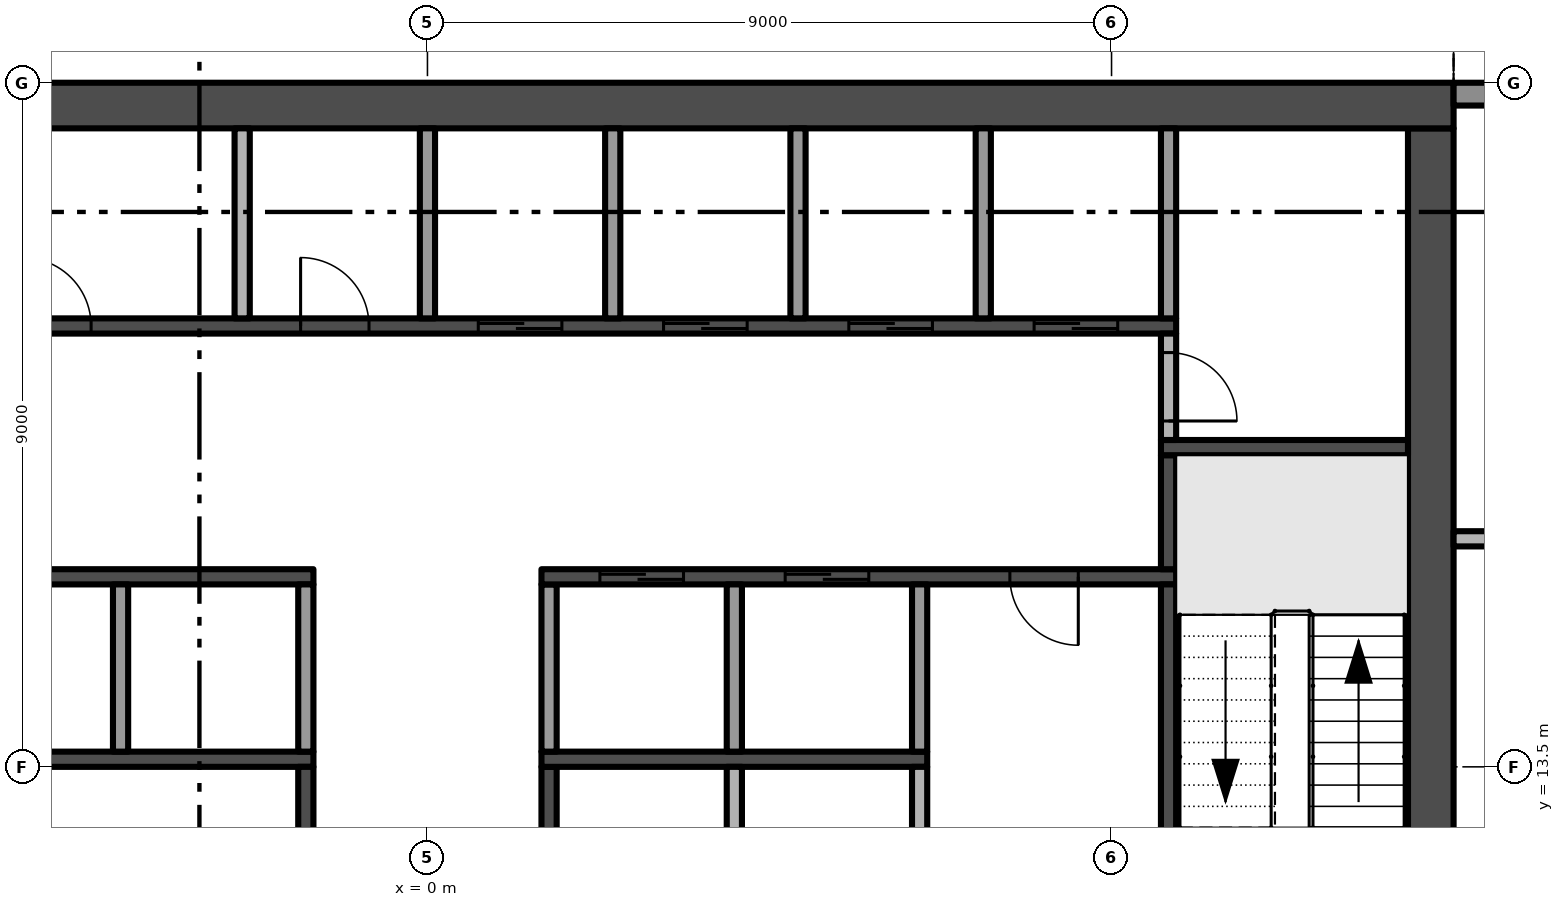
"""IFC4 building model, lengths in metres.
Left out: names, types, materials, properties, quantities, classifications, styles, units other than length and angle.
Written with IfcOpenShell. Run it as: python <this file> out.ifc"""

import sys

from ifc_helpers import new_model, si_unit, direction, frame, frame_2d, origin, place, context, subcontext, project, spatial, polyline, rectangle, outline, extrude, element, fill, save


model = new_model("IFC4")
c1 = context("Model", 3, precision=1e-05, world=origin(), true_north=direction((0.0, 1.0)))
c2 = subcontext(c1, "Body", "Model", "MODEL_VIEW")
j1 = project(units=[si_unit("LENGTHUNIT", "METRE"), si_unit("PLANEANGLEUNIT", "RADIAN")], contexts=[c1])
p1 = place(None, origin())
s1 = spatial("IfcSite", under=j1, at=p1, CompositionType="ELEMENT")
p2 = place(p1, origin())
s2 = spatial("IfcBuilding", under=s1, at=p2, CompositionType="ELEMENT")
p3 = place(p2, frame((0.0, 0.0, 246.4)))
s3 = spatial("IfcBuildingStorey", under=s2, at=p3, CompositionType="ELEMENT", Elevation=246.4)
p4 = place(p3, frame((13.2, 5.1, -0.3), z_axis=(0.0, 0.0, 1.0), x_axis=(0.0, 1.0, 0.0)))
e1 = element("IfcWall", 1, at=p4, inside=s3, PredefinedType="SHEAR", context=c2, shape_type="SweptSolid", body=[
    extrude(rectangle(XDim=16.8, YDim=0.6, at=frame_2d((8.4, 0.0))), origin(), (0.0, 0.0, 1.0), 3.8),
])
p5 = place(p4, frame((6.3, 0.0, 0.3)))
e2 = element("IfcOpeningElement", 2, at=p5, cuts=e1, PredefinedType="OPENING", context=c2, shape_type="SweptSolid", body=[
    extrude(rectangle(XDim=1.2, YDim=2.2, at=frame_2d((0.6, 1.1))), frame((0.0, 0.31, 0.0), z_axis=(0.0, -1.0, 0.0), x_axis=(1.0, 0.0, 0.0)), (0.0, 0.0, 1.0), 0.62),
])
p6 = place(p3, frame((13.5, 22.2, -0.3), z_axis=(0.0, 0.0, 1.0), x_axis=(-1.0, 0.0, 0.0)))
e3 = element("IfcWall", 3, at=p6, inside=s3, PredefinedType="SHEAR", context=c2, shape_type="SweptSolid", body=[
    extrude(rectangle(XDim=27.0, YDim=0.6, at=frame_2d((13.5, 0.0))), origin(), (0.0, 0.0, 1.0), 3.8),
])
p7 = place(p3, frame((13.5, 22.35, 0.0), z_axis=(0.0, 0.0, 1.0), x_axis=(1.0, 0.0, 0.0)))
e4 = element("IfcWall", 4, at=p7, inside=s3, PredefinedType="SOLIDWALL", context=c2, shape_type="SweptSolid", body=[
    extrude(rectangle(XDim=4.05, YDim=0.3, at=frame_2d((2.025, 0.0))), origin(), (0.0, 0.0, 1.0), 3.5),
])
p8 = place(p7, frame((0.55, 0.0, 0.45)))
e5 = element("IfcOpeningElement", 5, at=p8, cuts=e4, PredefinedType="OPENING", context=c2, shape_type="SweptSolid", body=[
    extrude(rectangle(XDim=3.2, YDim=2.65, at=frame_2d((1.6, 1.325))), frame((0.0, 0.16, 0.0), z_axis=(0.0, -1.0, 0.0), x_axis=(1.0, 0.0, 0.0)), (0.0, 0.0, 1.0), 0.32),
])
p9 = place(p3, origin())
e6 = element("IfcWall", 6, at=p9, inside=s3, PredefinedType="USERDEFINED", context=c2, shape_type="SweptSolid", body=[
    extrude(outline(polyline([(22.5, 25.149), (21.0, 25.485), (20.625, 25.5), (19.5, 25.369), (18.0, 24.845), (16.5, 24.112), (15.0, 23.451), (13.5, 23.115), (13.555, 22.871), (15.079, 23.213), (16.605, 23.885), (18.096, 24.614), (19.556, 25.124), (20.635, 25.249), (20.967, 25.236), (22.445, 24.905), (22.5, 25.149)])), origin(), (0.0, 0.0, 1.0), 0.9),
])
p10 = place(p3, frame((-1.5, 16.0, 0.0), z_axis=(0.0, 0.0, 1.0), x_axis=(-1.0, 0.0, 0.0)))
e7 = element("IfcWall", 7, at=p10, inside=s3, PredefinedType="SHEAR", context=c2, shape_type="SweptSolid", body=[
    extrude(rectangle(XDim=8.35, YDim=0.2, at=frame_2d((4.175, 0.0))), origin(), (0.0, 0.0, 1.0), 3.5),
])
p11 = place(p10, frame((6.162, 0.0, 0.0)))
e8 = element("IfcOpeningElement", 8, at=p11, cuts=e7, PredefinedType="OPENING", context=c2, shape_type="SweptSolid", body=[
    extrude(rectangle(XDim=0.9, YDim=2.1, at=frame_2d((0.45, 1.05))), frame((0.0, 0.11, 0.0), z_axis=(0.0, -1.0, 0.0), x_axis=(1.0, 0.0, 0.0)), (0.0, 0.0, 1.0), 0.22),
])
p12 = place(p3, frame((-9.85, 19.3, 0.0), z_axis=(0.0, 0.0, 1.0), x_axis=(1.0, 0.0, 0.0)))
e9 = element("IfcWall", 9, at=p12, inside=s3, PredefinedType="SHEAR", context=c2, shape_type="SweptSolid", body=[
    extrude(rectangle(XDim=19.7, YDim=0.2, at=frame_2d((9.85, 0.0))), origin(), (0.0, 0.0, 1.0), 3.5),
])
p13 = place(p12, frame((10.519, 0.0, 0.0)))
e10 = element("IfcOpeningElement", 10, at=p13, cuts=e9, PredefinedType="OPENING", context=c2, shape_type="SweptSolid", body=[
    extrude(rectangle(XDim=1.1, YDim=2.1, at=frame_2d((0.55, 1.05))), frame((0.0, 0.11, 0.0), z_axis=(0.0, -1.0, 0.0), x_axis=(1.0, 0.0, 0.0)), (0.0, 0.0, 1.0), 0.22),
])
p14 = place(p12, frame((12.956, 0.0, 0.0)))
e11 = element("IfcOpeningElement", 11, at=p14, cuts=e9, PredefinedType="OPENING", context=c2, shape_type="SweptSolid", body=[
    extrude(rectangle(XDim=1.1, YDim=2.1, at=frame_2d((0.55, 1.05))), frame((0.0, 0.11, 0.0), z_axis=(0.0, -1.0, 0.0), x_axis=(1.0, 0.0, 0.0)), (0.0, 0.0, 1.0), 0.22),
])
p15 = place(p12, frame((15.394, 0.0, 0.0)))
e12 = element("IfcOpeningElement", 12, at=p15, cuts=e9, PredefinedType="OPENING", context=c2, shape_type="SweptSolid", body=[
    extrude(rectangle(XDim=1.1, YDim=2.1, at=frame_2d((0.55, 1.05))), frame((0.0, 0.11, 0.0), z_axis=(0.0, -1.0, 0.0), x_axis=(1.0, 0.0, 0.0)), (0.0, 0.0, 1.0), 0.22),
])
p16 = place(p12, frame((17.831, 0.0, 0.0)))
e13 = element("IfcOpeningElement", 13, at=p16, cuts=e9, PredefinedType="OPENING", context=c2, shape_type="SweptSolid", body=[
    extrude(rectangle(XDim=1.1, YDim=2.1, at=frame_2d((0.55, 1.05))), frame((0.0, 0.11, 0.0), z_axis=(0.0, -1.0, 0.0), x_axis=(1.0, 0.0, 0.0)), (0.0, 0.0, 1.0), 0.22),
])
p17 = place(p12, frame((0.869, 0.0, 0.0)))
e14 = element("IfcOpeningElement", 14, at=p17, cuts=e9, PredefinedType="OPENING", context=c2, shape_type="SweptSolid", body=[
    extrude(rectangle(XDim=0.9, YDim=2.1, at=frame_2d((0.45, 1.05))), frame((0.0, 0.11, 0.0), z_axis=(0.0, -1.0, 0.0), x_axis=(1.0, 0.0, 0.0)), (0.0, 0.0, 1.0), 0.22),
])
p18 = place(p12, frame((4.525, 0.0, 0.0)))
e15 = element("IfcOpeningElement", 15, at=p18, cuts=e9, PredefinedType="OPENING", context=c2, shape_type="SweptSolid", body=[
    extrude(rectangle(XDim=0.9, YDim=2.1, at=frame_2d((0.45, 1.05))), frame((0.0, 0.11, 0.0), z_axis=(0.0, -1.0, 0.0), x_axis=(1.0, 0.0, 0.0)), (0.0, 0.0, 1.0), 0.22),
])
p19 = place(p12, frame((8.181, 0.0, 0.0)))
e16 = element("IfcOpeningElement", 16, at=p19, cuts=e9, PredefinedType="OPENING", context=c2, shape_type="SweptSolid", body=[
    extrude(rectangle(XDim=0.9, YDim=2.1, at=frame_2d((0.45, 1.05))), frame((0.0, 0.11, 0.0), z_axis=(0.0, -1.0, 0.0), x_axis=(1.0, 0.0, 0.0)), (0.0, 0.0, 1.0), 0.22),
])
p20 = place(p3, frame((-6.575, 13.6, 0.0), z_axis=(0.0, 0.0, 1.0), x_axis=(1.0, 0.0, 0.0)))
e17 = element("IfcWall", 17, at=p20, inside=s3, PredefinedType="SHEAR", context=c2, shape_type="SweptSolid", body=[
    extrude(rectangle(XDim=5.075, YDim=0.2, at=frame_2d((2.538, 0.0))), origin(), (0.0, 0.0, 1.0), 3.5),
])
p21 = place(p3, frame((-4.037, 13.7, 0.0), z_axis=(0.0, 0.0, 1.0), x_axis=(0.0, 1.0, 0.0)))
e18 = element("IfcWall", 18, at=p21, inside=s3, PredefinedType="PARTITIONING", context=c2, shape_type="SweptSolid", body=[
    extrude(rectangle(XDim=2.2, YDim=0.2, at=frame_2d((1.1, 0.0))), origin(), (0.0, 0.0, 1.0), 3.5),
])
p22 = place(p3, frame((-2.438, 19.4, 0.0), z_axis=(0.0, 0.0, 1.0), x_axis=(0.0, 1.0, 0.0)))
e19 = element("IfcWall", 19, at=p22, inside=s3, PredefinedType="PARTITIONING", context=c2, shape_type="SweptSolid", body=[
    extrude(rectangle(XDim=2.5, YDim=0.2, at=frame_2d((1.25, 0.0))), origin(), (0.0, 0.0, 1.0), 3.5),
])
p23 = place(p3, frame((-1.6, 8.15, 0.0), z_axis=(0.0, 0.0, 1.0), x_axis=(0.0, 1.0, 0.0)))
e20 = element("IfcWall", 20, at=p23, inside=s3, PredefinedType="SHEAR", context=c2, shape_type="SweptSolid", body=[
    extrude(rectangle(XDim=5.35, YDim=0.2, at=frame_2d((2.675, 0.0))), origin(), (0.0, 0.0, 1.0), 3.5),
])
p24 = place(p23, frame((2.225, 0.0, 0.0)))
e21 = element("IfcOpeningElement", 21, at=p24, cuts=e20, PredefinedType="OPENING", context=c2, shape_type="SweptSolid", body=[
    extrude(rectangle(XDim=0.9, YDim=2.1, at=frame_2d((0.45, 1.05))), frame((0.0, 0.11, 0.0), z_axis=(0.0, -1.0, 0.0), x_axis=(1.0, 0.0, 0.0)), (0.0, 0.0, 1.0), 0.22),
])
p25 = place(p3, frame((-1.6, 13.7, 0.0), z_axis=(0.0, 0.0, 1.0), x_axis=(0.0, 1.0, 0.0)))
e22 = element("IfcWall", 22, at=p25, inside=s3, PredefinedType="PARTITIONING", context=c2, shape_type="SweptSolid", body=[
    extrude(rectangle(XDim=2.2, YDim=0.2, at=frame_2d((1.1, 0.0))), origin(), (0.0, 0.0, 1.0), 3.5),
])
p26 = place(p3, frame((0.0, 19.4, 0.0), z_axis=(0.0, 0.0, 1.0), x_axis=(0.0, 1.0, 0.0)))
e23 = element("IfcWall", 23, at=p26, inside=s3, PredefinedType="PARTITIONING", context=c2, shape_type="SweptSolid", body=[
    extrude(rectangle(XDim=2.5, YDim=0.2, at=frame_2d((1.25, 0.0))), origin(), (0.0, 0.0, 1.0), 3.5),
])
p27 = place(p3, frame((1.6, 13.5, 0.0), z_axis=(0.0, 0.0, 1.0), x_axis=(0.0, -1.0, 0.0)))
e24 = element("IfcWall", 24, at=p27, inside=s3, PredefinedType="SHEAR", context=c2, shape_type="SweptSolid", body=[
    extrude(rectangle(XDim=3.5, YDim=0.2, at=frame_2d((1.75, 0.0))), origin(), (0.0, 0.0, 1.0), 3.5),
])
p28 = place(p27, frame((1.3, 0.0, 0.0)))
e25 = element("IfcOpeningElement", 25, at=p28, cuts=e24, PredefinedType="OPENING", context=c2, shape_type="SweptSolid", body=[
    extrude(rectangle(XDim=0.9, YDim=2.1, at=frame_2d((0.45, 1.05))), frame((0.0, 0.11, 0.0), z_axis=(0.0, -1.0, 0.0), x_axis=(1.0, 0.0, 0.0)), (0.0, 0.0, 1.0), 0.22),
])
p29 = place(p3, frame((1.5, 13.6, 0.0), z_axis=(0.0, 0.0, 1.0), x_axis=(1.0, 0.0, 0.0)))
e26 = element("IfcWall", 26, at=p29, inside=s3, PredefinedType="SHEAR", context=c2, shape_type="SweptSolid", body=[
    extrude(rectangle(XDim=5.075, YDim=0.2, at=frame_2d((2.538, 0.0))), origin(), (0.0, 0.0, 1.0), 3.5),
])
p30 = place(p3, frame((1.6, 13.7, 0.0), z_axis=(0.0, 0.0, 1.0), x_axis=(0.0, 1.0, 0.0)))
e27 = element("IfcWall", 27, at=p30, inside=s3, PredefinedType="PARTITIONING", context=c2, shape_type="SweptSolid", body=[
    extrude(rectangle(XDim=2.2, YDim=0.2, at=frame_2d((1.1, 0.0))), origin(), (0.0, 0.0, 1.0), 3.5),
])
p31 = place(p3, frame((9.85, 16.0, 0.0), z_axis=(0.0, 0.0, 1.0), x_axis=(-1.0, 0.0, 0.0)))
e28 = element("IfcWall", 28, at=p31, inside=s3, PredefinedType="SHEAR", context=c2, shape_type="SweptSolid", body=[
    extrude(rectangle(XDim=8.35, YDim=0.2, at=frame_2d((4.175, 0.0))), origin(), (0.0, 0.0, 1.0), 3.5),
])
p32 = place(p31, frame((6.481, 0.0, 0.0)))
e29 = element("IfcOpeningElement", 29, at=p32, cuts=e28, PredefinedType="OPENING", context=c2, shape_type="SweptSolid", body=[
    extrude(rectangle(XDim=1.1, YDim=2.1, at=frame_2d((0.55, 1.05))), frame((0.0, 0.11, 0.0), z_axis=(0.0, -1.0, 0.0), x_axis=(1.0, 0.0, 0.0)), (0.0, 0.0, 1.0), 0.22),
])
p33 = place(p31, frame((4.044, 0.0, 0.0)))
e30 = element("IfcOpeningElement", 30, at=p33, cuts=e28, PredefinedType="OPENING", context=c2, shape_type="SweptSolid", body=[
    extrude(rectangle(XDim=1.1, YDim=2.1, at=frame_2d((0.55, 1.05))), frame((0.0, 0.11, 0.0), z_axis=(0.0, -1.0, 0.0), x_axis=(1.0, 0.0, 0.0)), (0.0, 0.0, 1.0), 0.22),
])
p34 = place(p31, frame((1.288, 0.0, 0.0)))
e31 = element("IfcOpeningElement", 31, at=p34, cuts=e28, PredefinedType="OPENING", context=c2, shape_type="SweptSolid", body=[
    extrude(rectangle(XDim=0.9, YDim=2.1, at=frame_2d((0.45, 1.05))), frame((0.0, 0.11, 0.0), z_axis=(0.0, -1.0, 0.0), x_axis=(1.0, 0.0, 0.0)), (0.0, 0.0, 1.0), 0.22),
])
p35 = place(p3, frame((2.438, 19.4, 0.0), z_axis=(0.0, 0.0, 1.0), x_axis=(0.0, 1.0, 0.0)))
e32 = element("IfcWall", 32, at=p35, inside=s3, PredefinedType="PARTITIONING", context=c2, shape_type="SweptSolid", body=[
    extrude(rectangle(XDim=2.5, YDim=0.2, at=frame_2d((1.25, 0.0))), origin(), (0.0, 0.0, 1.0), 3.5),
])
p36 = place(p3, frame((4.037, 10.0, 0.0), z_axis=(0.0, 0.0, 1.0), x_axis=(0.0, 1.0, 0.0)))
e33 = element("IfcWall", 33, at=p36, inside=s3, PredefinedType="PARTITIONING", context=c2, shape_type="SweptSolid", body=[
    extrude(rectangle(XDim=3.5, YDim=0.2, at=frame_2d((1.75, 0.0))), origin(), (0.0, 0.0, 1.0), 3.5),
])
p37 = place(p3, frame((4.037, 13.7, 0.0), z_axis=(0.0, 0.0, 1.0), x_axis=(0.0, 1.0, 0.0)))
e34 = element("IfcWall", 34, at=p37, inside=s3, PredefinedType="PARTITIONING", context=c2, shape_type="SweptSolid", body=[
    extrude(rectangle(XDim=2.2, YDim=0.2, at=frame_2d((1.1, 0.0))), origin(), (0.0, 0.0, 1.0), 3.5),
])
p38 = place(p3, frame((4.875, 19.4, 0.0), z_axis=(0.0, 0.0, 1.0), x_axis=(0.0, 1.0, 0.0)))
e35 = element("IfcWall", 35, at=p38, inside=s3, PredefinedType="PARTITIONING", context=c2, shape_type="SweptSolid", body=[
    extrude(rectangle(XDim=2.5, YDim=0.2, at=frame_2d((1.25, 0.0))), origin(), (0.0, 0.0, 1.0), 3.5),
])
p39 = place(p3, frame((6.475, 12.3, 0.0), z_axis=(0.0, 0.0, 1.0), x_axis=(0.0, 1.0, 0.0)))
e36 = element("IfcWall", 36, at=p39, inside=s3, PredefinedType="PARTITIONING", context=c2, shape_type="SweptSolid", body=[
    extrude(rectangle(XDim=1.2, YDim=0.2, at=frame_2d((0.6, 0.0))), origin(), (0.0, 0.0, 1.0), 3.5),
])
p40 = place(p3, frame((6.475, 13.7, 0.0), z_axis=(0.0, 0.0, 1.0), x_axis=(0.0, 1.0, 0.0)))
e37 = element("IfcWall", 37, at=p40, inside=s3, PredefinedType="PARTITIONING", context=c2, shape_type="SweptSolid", body=[
    extrude(rectangle(XDim=2.2, YDim=0.2, at=frame_2d((1.1, 0.0))), origin(), (0.0, 0.0, 1.0), 3.5),
])
p41 = place(p3, frame((7.312, 19.4, 0.0), z_axis=(0.0, 0.0, 1.0), x_axis=(0.0, 1.0, 0.0)))
e38 = element("IfcWall", 38, at=p41, inside=s3, PredefinedType="PARTITIONING", context=c2, shape_type="SweptSolid", body=[
    extrude(rectangle(XDim=2.5, YDim=0.2, at=frame_2d((1.25, 0.0))), origin(), (0.0, 0.0, 1.0), 3.5),
])
p42 = place(p3, frame((9.75, 12.3, 0.0), z_axis=(0.0, 0.0, 1.0), x_axis=(0.0, 1.0, 0.0)))
e39 = element("IfcWall", 39, at=p42, inside=s3, PredefinedType="SHEAR", context=c2, shape_type="SweptSolid", body=[
    extrude(rectangle(XDim=3.6, YDim=0.2, at=frame_2d((1.8, 0.0))), origin(), (0.0, 0.0, 1.0), 3.5),
])
p43 = place(p3, frame((9.75, 16.1, 0.0), z_axis=(0.0, 0.0, 1.0), x_axis=(0.0, 1.0, 0.0)))
e40 = element("IfcWall", 40, at=p43, inside=s3, PredefinedType="SHEAR", context=c2, shape_type="SweptSolid", body=[
    extrude(rectangle(XDim=1.5, YDim=0.2, at=frame_2d((0.75, 0.0))), origin(), (0.0, 0.0, 1.0), 3.5),
])
p44 = place(p3, frame((9.65, 17.7, 0.0), z_axis=(0.0, 0.0, 1.0), x_axis=(1.0, 0.0, 0.0)))
e41 = element("IfcWall", 41, at=p44, inside=s3, PredefinedType="SHEAR", context=c2, shape_type="SweptSolid", body=[
    extrude(rectangle(XDim=3.25, YDim=0.2, at=frame_2d((1.625, 0.0))), origin(), (0.0, 0.0, 1.0), 3.5),
])
p45 = place(p3, frame((9.75, 19.2, 0.0), z_axis=(0.0, 0.0, 1.0), x_axis=(0.0, -1.0, 0.0)))
e42 = element("IfcWall", 42, at=p45, inside=s3, PredefinedType="PARTITIONING", context=c2, shape_type="SweptSolid", body=[
    extrude(rectangle(XDim=1.4, YDim=0.2, at=frame_2d((0.7, 0.0))), origin(), (0.0, 0.0, 1.0), 3.5),
])
p46 = place(p45, frame((0.25, 0.0, 0.0)))
e43 = element("IfcOpeningElement", 43, at=p46, cuts=e42, PredefinedType="OPENING", context=c2, shape_type="SweptSolid", body=[
    extrude(rectangle(XDim=0.9, YDim=2.1, at=frame_2d((0.45, 1.05))), frame((0.0, 0.11, 0.0), z_axis=(0.0, -1.0, 0.0), x_axis=(1.0, 0.0, 0.0)), (0.0, 0.0, 1.0), 0.22),
])
p47 = place(p3, frame((9.75, 19.4, 0.0), z_axis=(0.0, 0.0, 1.0), x_axis=(0.0, 1.0, 0.0)))
e44 = element("IfcWall", 44, at=p47, inside=s3, PredefinedType="PARTITIONING", context=c2, shape_type="SweptSolid", body=[
    extrude(rectangle(XDim=2.5, YDim=0.2, at=frame_2d((1.25, 0.0))), origin(), (0.0, 0.0, 1.0), 3.5),
])
p48 = place(p3, frame((13.5, 16.5, 0.0), z_axis=(0.0, 0.0, 1.0), x_axis=(1.0, 0.0, 0.0)))
e45 = element("IfcWall", 45, at=p48, inside=s3, PredefinedType="PARTITIONING", context=c2, shape_type="SweptSolid", body=[
    extrude(rectangle(XDim=3.825, YDim=0.2, at=frame_2d((1.913, 0.0))), origin(), (0.0, 0.0, 1.0), 3.5),
])
p49 = place(p48, frame((1.55, 0.0, 0.0)))
e46 = element("IfcOpeningElement", 46, at=p49, cuts=e45, PredefinedType="OPENING", context=c2, shape_type="SweptSolid", body=[
    extrude(rectangle(XDim=0.9, YDim=2.1, at=frame_2d((0.45, 1.05))), frame((0.0, 0.11, 0.0), z_axis=(0.0, -1.0, 0.0), x_axis=(1.0, 0.0, 0.0)), (0.0, 0.0, 1.0), 0.22),
])
p50 = place(p13, origin())
e47 = element("IfcDoor", 47, at=p50, inside=s3, OperationType="SLIDING_TO_RIGHT", PredefinedType="DOOR", context=c2, shape_type="SweptSolid", body=[
    extrude(rectangle(XDim=1.1, YDim=2.1, at=frame_2d((0.55, 1.05))), frame((0.0, 0.025, 0.0), z_axis=(0.0, -1.0, 0.0), x_axis=(1.0, 0.0, 0.0)), (0.0, 0.0, 1.0), 0.05),
])
fill(e10, e47)
p51 = place(p14, origin())
e48 = element("IfcDoor", 48, at=p51, inside=s3, OperationType="SLIDING_TO_RIGHT", PredefinedType="DOOR", context=c2, shape_type="SweptSolid", body=[
    extrude(rectangle(XDim=1.1, YDim=2.1, at=frame_2d((0.55, 1.05))), frame((0.0, 0.025, 0.0), z_axis=(0.0, -1.0, 0.0), x_axis=(1.0, 0.0, 0.0)), (0.0, 0.0, 1.0), 0.05),
])
fill(e11, e48)
p52 = place(p15, origin())
e49 = element("IfcDoor", 49, at=p52, inside=s3, OperationType="SLIDING_TO_RIGHT", PredefinedType="DOOR", context=c2, shape_type="SweptSolid", body=[
    extrude(rectangle(XDim=1.1, YDim=2.1, at=frame_2d((0.55, 1.05))), frame((0.0, 0.025, 0.0), z_axis=(0.0, -1.0, 0.0), x_axis=(1.0, 0.0, 0.0)), (0.0, 0.0, 1.0), 0.05),
])
fill(e12, e49)
p53 = place(p16, origin())
e50 = element("IfcDoor", 50, at=p53, inside=s3, OperationType="SLIDING_TO_RIGHT", PredefinedType="DOOR", context=c2, shape_type="SweptSolid", body=[
    extrude(rectangle(XDim=1.1, YDim=2.1, at=frame_2d((0.55, 1.05))), frame((0.0, 0.025, 0.0), z_axis=(0.0, -1.0, 0.0), x_axis=(1.0, 0.0, 0.0)), (0.0, 0.0, 1.0), 0.05),
])
fill(e13, e50)
p54 = place(p32, origin())
e51 = element("IfcDoor", 51, at=p54, inside=s3, OperationType="SLIDING_TO_RIGHT", PredefinedType="DOOR", context=c2, shape_type="SweptSolid", body=[
    extrude(rectangle(XDim=1.1, YDim=2.1, at=frame_2d((0.55, 1.05))), frame((0.0, 0.025, 0.0), z_axis=(0.0, -1.0, 0.0), x_axis=(1.0, 0.0, 0.0)), (0.0, 0.0, 1.0), 0.05),
])
fill(e29, e51)
p55 = place(p33, origin())
e52 = element("IfcDoor", 52, at=p55, inside=s3, OperationType="SLIDING_TO_RIGHT", PredefinedType="DOOR", context=c2, shape_type="SweptSolid", body=[
    extrude(rectangle(XDim=1.1, YDim=2.1, at=frame_2d((0.55, 1.05))), frame((0.0, 0.025, 0.0), z_axis=(0.0, -1.0, 0.0), x_axis=(1.0, 0.0, 0.0)), (0.0, 0.0, 1.0), 0.05),
])
fill(e30, e52)
p56 = place(p34, origin())
e53 = element("IfcDoor", 53, at=p56, inside=s3, OperationType="SINGLE_SWING_LEFT", PredefinedType="DOOR", context=c2, shape_type="SweptSolid", body=[
    extrude(rectangle(XDim=0.9, YDim=2.1, at=frame_2d((0.45, 1.05))), frame((0.0, 0.025, 0.0), z_axis=(0.0, -1.0, 0.0), x_axis=(1.0, 0.0, 0.0)), (0.0, 0.0, 1.0), 0.05),
])
fill(e31, e53)
p57 = place(p46, origin())
e54 = element("IfcDoor", 54, at=p57, inside=s3, OperationType="SINGLE_SWING_RIGHT", PredefinedType="DOOR", context=c2, shape_type="SweptSolid", body=[
    extrude(rectangle(XDim=0.9, YDim=2.1, at=frame_2d((0.45, 1.05))), frame((0.0, 0.025, 0.0), z_axis=(0.0, -1.0, 0.0), x_axis=(1.0, 0.0, 0.0)), (0.0, 0.0, 1.0), 0.05),
])
fill(e43, e54)
p58 = place(p18, origin())
e55 = element("IfcDoor", 55, at=p58, inside=s3, OperationType="SINGLE_SWING_LEFT", PredefinedType="DOOR", context=c2, shape_type="SweptSolid", body=[
    extrude(rectangle(XDim=0.9, YDim=2.1, at=frame_2d((0.45, 1.05))), frame((0.0, 0.025, 0.0), z_axis=(0.0, -1.0, 0.0), x_axis=(1.0, 0.0, 0.0)), (0.0, 0.0, 1.0), 0.05),
])
fill(e15, e55)
p59 = place(p19, origin())
e56 = element("IfcDoor", 56, at=p59, inside=s3, OperationType="SINGLE_SWING_LEFT", PredefinedType="DOOR", context=c2, shape_type="SweptSolid", body=[
    extrude(rectangle(XDim=0.9, YDim=2.1, at=frame_2d((0.45, 1.05))), frame((0.0, 0.025, 0.0), z_axis=(0.0, -1.0, 0.0), x_axis=(1.0, 0.0, 0.0)), (0.0, 0.0, 1.0), 0.05),
])
fill(e16, e56)
save(model, sys.argv[1])
